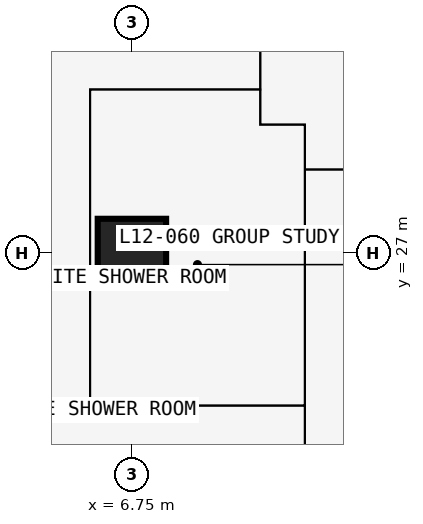
"""IFC4 building model, lengths in metres.
Left out: names, types, materials, properties, quantities, classifications, styles, units other than length and angle.
Written with IfcOpenShell. Run it as: python <this file> out.ifc"""

import sys

from ifc_helpers import new_model, si_unit, direction, frame, frame_2d, origin, origin_2d, place, context, subcontext, project, spatial, rectangle, extrude, element, fill, save


model = new_model("IFC4")
c1 = context("Model", 3, precision=1e-05, world=origin(), true_north=direction((0.0, 1.0)))
c2 = subcontext(c1, "Body", "Model", "MODEL_VIEW")
j1 = project(units=[si_unit("LENGTHUNIT", "METRE"), si_unit("PLANEANGLEUNIT", "RADIAN")], contexts=[c1])
p1 = place(None, origin())
s1 = spatial("IfcSite", under=j1, at=p1, CompositionType="ELEMENT")
p2 = place(p1, origin())
s2 = spatial("IfcBuilding", under=s1, at=p2, CompositionType="ELEMENT")
p3 = place(p2, frame((0.0, 0.0, 46.8)))
s3 = spatial("IfcBuildingStorey", under=s2, at=p3, CompositionType="ELEMENT", Elevation=46.8)
p4 = place(p3, frame((6.75, 27.0, 0.0), z_axis=(0.0, 0.0, 1.0), x_axis=(1.0, 0.0, 0.0)))
e1 = element("IfcColumn", 1, at=p4, inside=s3, PredefinedType="COLUMN", context=c2, shape_type="SweptSolid", body=[
    extrude(rectangle(XDim=1.8, YDim=1.8, at=origin_2d()), origin(), (0.0, 0.0, 1.0), 3.6),
])
p5 = place(p3, frame((5.65, 22.988, 0.0), z_axis=(0.0, 0.0, 1.0), x_axis=(0.0, 1.0, 0.0)))
e2 = element("IfcWall", 2, at=p5, inside=s3, PredefinedType="PARTITIONING", context=c2, shape_type="SweptSolid", body=[
    extrude(rectangle(XDim=8.312, YDim=0.15, at=frame_2d((4.156, 0.0))), origin(), (0.0, 0.0, 1.0), 3.375),
])
p6 = place(p5, frame((4.95, 0.0, 0.0)))
e3 = element("IfcOpeningElement", 3, at=p6, cuts=e2, PredefinedType="OPENING", context=c2, shape_type="SweptSolid", body=[
    extrude(rectangle(XDim=0.95, YDim=2.2, at=frame_2d((0.475, 1.1))), frame((0.0, 0.085, 0.0), z_axis=(0.0, -1.0, 0.0), x_axis=(1.0, 0.0, 0.0)), (0.0, 0.0, 1.0), 0.17),
])
p7 = place(p3, frame((5.65, 22.988, 0.0), z_axis=(0.0, 0.0, 1.0), x_axis=(1.0, 0.0, 0.0)))
e4 = element("IfcWall", 4, at=p7, inside=s3, PredefinedType="PARTITIONING", context=c2, shape_type="SweptSolid", body=[
    extrude(rectangle(XDim=5.65, YDim=0.15, at=frame_2d((2.825, 0.0))), origin(), (0.0, 0.0, 1.0), 3.375),
])
p8 = place(p3, frame((5.65, 31.3, 0.0), z_axis=(0.0, 0.0, 1.0), x_axis=(1.0, 0.0, 0.0)))
e5 = element("IfcWall", 5, at=p8, inside=s3, PredefinedType="PARTITIONING", context=c2, shape_type="SweptSolid", body=[
    extrude(rectangle(XDim=4.475, YDim=0.15, at=frame_2d((2.238, 0.0))), origin(), (0.0, 0.0, 1.0), 3.375),
])
p9 = place(p3, frame((10.125, 30.375, 0.0), z_axis=(0.0, 0.0, 1.0), x_axis=(0.0, 1.0, 0.0)))
e6 = element("IfcWall", 6, at=p9, inside=s3, PredefinedType="PARTITIONING", context=c2, shape_type="SweptSolid", body=[
    extrude(rectangle(XDim=10.859, YDim=0.15, at=frame_2d((5.429, 0.0))), origin(), (0.0, 0.0, 1.0), 3.375),
])
p10 = place(p3, frame((10.125, 30.375, 0.0), z_axis=(0.0, 0.0, 1.0), x_axis=(1.0, 0.0, 0.0)))
e7 = element("IfcWall", 7, at=p10, inside=s3, PredefinedType="PARTITIONING", context=c2, shape_type="SweptSolid", body=[
    extrude(rectangle(XDim=1.175, YDim=0.15, at=frame_2d((0.587, 0.0))), origin(), (0.0, 0.0, 1.0), 3.375),
])
p11 = place(p3, frame((11.3, 11.3, 0.0), z_axis=(0.0, 0.0, 1.0), x_axis=(0.0, 1.0, 0.0)))
e8 = element("IfcWall", 8, at=p11, inside=s3, PredefinedType="PARTITIONING", context=c2, shape_type="SweptSolid", body=[
    extrude(rectangle(XDim=19.075, YDim=0.15, at=frame_2d((9.538, 0.0))), origin(), (0.0, 0.0, 1.0), 3.375),
])
p12 = place(p11, frame((10.137, 0.0, 0.0)))
e9 = element("IfcOpeningElement", 9, at=p12, cuts=e8, PredefinedType="OPENING", context=c2, shape_type="SweptSolid", body=[
    extrude(rectangle(XDim=1.0, YDim=2.2, at=frame_2d((0.5, 1.1))), frame((0.0, 0.085, 0.0), z_axis=(0.0, -1.0, 0.0), x_axis=(1.0, 0.0, 0.0)), (0.0, 0.0, 1.0), 0.17),
])
p13 = place(p3, frame((11.3, 29.2, 0.0), z_axis=(0.0, 0.0, 1.0), x_axis=(1.0, 0.0, 0.0)))
e10 = element("IfcWall", 10, at=p13, inside=s3, PredefinedType="PARTITIONING", context=c2, shape_type="SweptSolid", body=[
    extrude(rectangle(XDim=19.075, YDim=0.15, at=frame_2d((9.538, 0.0))), origin(), (0.0, 0.0, 1.0), 3.375),
])
p14 = place(p13, frame((14.25, 0.0, 0.0)))
e11 = element("IfcOpeningElement", 11, at=p14, cuts=e10, PredefinedType="OPENING", context=c2, shape_type="SweptSolid", body=[
    extrude(rectangle(XDim=1.0, YDim=2.2, at=frame_2d((0.5, 1.1))), frame((0.0, 0.085, 0.0), z_axis=(0.0, -1.0, 0.0), x_axis=(1.0, 0.0, 0.0)), (0.0, 0.0, 1.0), 0.17),
])
p15 = place(p13, frame((16.35, 0.0, 0.0)))
e12 = element("IfcOpeningElement", 12, at=p15, cuts=e10, PredefinedType="OPENING", context=c2, shape_type="SweptSolid", body=[
    extrude(rectangle(XDim=1.0, YDim=2.2, at=frame_2d((0.5, 1.1))), frame((0.0, 0.085, 0.0), z_axis=(0.0, -1.0, 0.0), x_axis=(1.0, 0.0, 0.0)), (0.0, 0.0, 1.0), 0.17),
])
p16 = place(p13, frame((8.859, 0.0, 0.0)))
e13 = element("IfcOpeningElement", 13, at=p16, cuts=e10, PredefinedType="OPENING", context=c2, shape_type="SweptSolid", body=[
    extrude(rectangle(XDim=1.5, YDim=2.2, at=frame_2d((0.75, 1.1))), frame((0.0, 0.085, 0.0), z_axis=(0.0, -1.0, 0.0), x_axis=(1.0, 0.0, 0.0)), (0.0, 0.0, 1.0), 0.17),
])
p17 = place(p12, origin())
e14 = element("IfcDoor", 14, at=p17, inside=s3, OperationType="SINGLE_SWING_LEFT", PredefinedType="DOOR", context=c2, shape_type="SweptSolid", body=[
    extrude(rectangle(XDim=1.0, YDim=2.2, at=frame_2d((0.5, 1.1))), frame((0.0, 0.025, 0.0), z_axis=(0.0, -1.0, 0.0), x_axis=(1.0, 0.0, 0.0)), (0.0, 0.0, 1.0), 0.05),
])
fill(e9, e14)
p18 = place(p6, origin())
e15 = element("IfcDoor", 15, at=p18, inside=s3, OperationType="SINGLE_SWING_LEFT", PredefinedType="DOOR", context=c2, shape_type="SweptSolid", body=[
    extrude(rectangle(XDim=0.95, YDim=2.2, at=frame_2d((0.475, 1.1))), frame((0.0, 0.025, 0.0), z_axis=(0.0, -1.0, 0.0), x_axis=(1.0, 0.0, 0.0)), (0.0, 0.0, 1.0), 0.05),
])
fill(e3, e15)
save(model, sys.argv[1])
